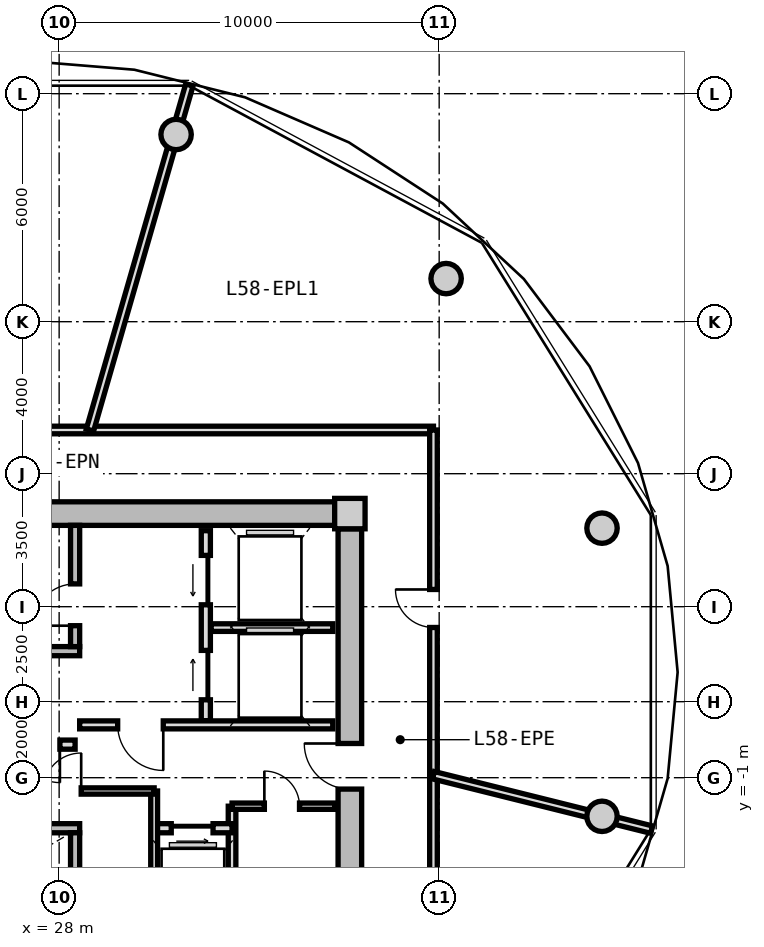
"""IFC4 building model, lengths in metres.
Left out: names, types, materials, properties, quantities, classifications, styles, units other than length and angle.
Written with IfcOpenShell. Run it as: python <this file> out.ifc"""

import sys

from ifc_helpers import new_model, si_unit, direction, frame, frame_2d, origin, origin_2d, place, context, subcontext, project, spatial, rectangle, circle, extrude, source, transform, mapped, element, fill, save


model = new_model("IFC4")
c1 = context("Model", 3, precision=1e-05, world=origin(), true_north=direction((0.0, 1.0)))
c2 = subcontext(c1, "Body", "Model", "MODEL_VIEW")
j1 = project(units=[si_unit("LENGTHUNIT", "METRE"), si_unit("PLANEANGLEUNIT", "RADIAN")], contexts=[c1])
p1 = place(None, origin())
s1 = spatial("IfcSite", under=j1, at=p1, CompositionType="ELEMENT")
p2 = place(p1, origin())
s2 = spatial("IfcBuilding", under=s1, at=p2, CompositionType="ELEMENT")
p3 = place(p2, frame((0.0, 0.0, 186.15)))
s3 = spatial("IfcBuildingStorey", under=s2, at=p3, CompositionType="ELEMENT", Elevation=186.15)
m1 = source(origin(), c2, "Body", "SweptSolid", [
    extrude(rectangle(XDim=0.8, YDim=0.8, at=origin_2d()), origin(), (0.0, 0.0, 1.0), 4.5),
])
p4 = place(p3, frame((35.65, 5.95, 0.0), z_axis=(0.0, 0.0, 1.0), x_axis=(1.0, 0.0, 0.0)))
e1 = element("IfcColumn", 1, at=p4, inside=s3, PredefinedType="COLUMN", context=c2, shape_type="MappedRepresentation", body=[
    mapped(m1, transform((0.0, 0.0, 0.0), x_axis=(1.0, 0.0, 0.0), y_axis=(0.0, 1.0, 0.0), z_axis=(0.0, 0.0, 1.0), scale=1.0)),
])
m2 = source(origin(), c2, "Body", "SweptSolid", [
    extrude(rectangle(XDim=14.5, YDim=0.62, at=frame_2d((7.25, 0.0))), origin(), (0.0, 0.0, 1.0), 4.08),
])
p5 = place(p3, frame((20.75, 5.95, 0.0), z_axis=(0.0, 0.0, 1.0), x_axis=(1.0, 0.0, 0.0)))
e2 = element("IfcWall", 2, at=p5, inside=s3, PredefinedType="SHEAR", context=c2, shape_type="MappedRepresentation", body=[
    mapped(m2, transform((0.0, 0.0, 0.0), x_axis=(1.0, 0.0, 0.0), y_axis=(0.0, 1.0, 0.0), z_axis=(0.0, 0.0, 1.0), scale=1.0)),
])
m3 = source(origin(), c2, "Body", "SweptSolid", [
    extrude(rectangle(XDim=11.1, YDim=0.62, at=frame_2d((5.55, 0.0))), origin(), (0.0, 0.0, 1.0), 4.08),
])
p6 = place(p3, frame((35.65, 5.55, 0.0), z_axis=(0.0, 0.0, 1.0), x_axis=(0.0, -1.0, 0.0)))
e3 = element("IfcWall", 3, at=p6, inside=s3, PredefinedType="SHEAR", context=c2, shape_type="MappedRepresentation", body=[
    mapped(m3, transform((0.0, 0.0, 0.0), x_axis=(1.0, 0.0, 0.0), y_axis=(0.0, 1.0, 0.0), z_axis=(0.0, 0.0, 1.0), scale=1.0)),
])
p7 = place(p6, frame((5.65, 0.0, 0.0)))
e4 = element("IfcOpeningElement", 4, at=p7, cuts=e3, PredefinedType="OPENING", context=c2, shape_type="SweptSolid", body=[
    extrude(rectangle(XDim=1.2, YDim=2.15, at=frame_2d((0.6, 1.075))), frame((0.0, 0.32, 0.0), z_axis=(0.0, -1.0, 0.0), x_axis=(1.0, 0.0, 0.0)), (0.0, 0.0, 1.0), 0.64),
])
p8 = place(p6, frame((9.3, 0.0, 0.0)))
e5 = element("IfcOpeningElement", 5, at=p8, cuts=e3, PredefinedType="OPENING", context=c2, shape_type="SweptSolid", body=[
    extrude(rectangle(XDim=1.0, YDim=2.1, at=frame_2d((0.5, 1.05))), frame((0.0, 0.32, 0.0), z_axis=(0.0, -1.0, 0.0), x_axis=(1.0, 0.0, 0.0)), (0.0, 0.0, 1.0), 0.64),
])
m4 = source(origin(), c2, "Body", "SweptSolid", [
    extrude(circle(Radius=0.4, at=origin_2d()), origin(), (0.0, 0.0, 1.0), 4.08),
])
for number, where, z_axis, x_axis in (
    (6, (42.285, 5.567, 0.0), (0.0, 0.0, 1.0), (1.0, 0.0, 0.0)),
    (7, (38.183, 12.135, 0.0), (0.0, 0.0, 1.0), (1.0, 0.0, 0.0)),
    (8, (31.077, 15.926, 0.0), (0.0, 0.0, 1.0), (1.0, 0.0, 0.0)),
    (9, (42.285, -2.016, 0.0), (0.0, 0.0, 1.0), (1.0, 0.0, 0.0)),
):
    element("IfcColumn", number, at=place(p3, frame(where, z_axis=z_axis, x_axis=x_axis)), inside=s3, PredefinedType="COLUMN", context=c2, shape_type="MappedRepresentation", body=[
        mapped(m4, transform((0.0, 0.0, 0.0), x_axis=(1.0, 0.0, 0.0), y_axis=(0.0, 1.0, 0.0), z_axis=(0.0, 0.0, 1.0), scale=1.0)),
    ])
m5 = source(origin(), c2, "Body", "SweptSolid", [
    extrude(rectangle(XDim=7.88, YDim=0.24, at=frame_2d((3.94, 0.0))), origin(), (0.0, 0.0, 1.0), 4.08),
])
p9 = place(p3, frame((20.66, 2.33, 0.0), z_axis=(0.0, 0.0, 1.0), x_axis=(1.0, 0.0, 0.0)))
e10 = element("IfcWall", 10, at=p9, inside=s3, PredefinedType="PARTITIONING", context=c2, shape_type="MappedRepresentation", body=[
    mapped(m5, transform((0.0, 0.0, 0.0), x_axis=(1.0, 0.0, 0.0), y_axis=(0.0, 1.0, 0.0), z_axis=(0.0, 0.0, 1.0), scale=1.0)),
])
m6 = source(origin(), c2, "Body", "SweptSolid", [
    extrude(rectangle(XDim=3.19, YDim=0.24, at=frame_2d((1.595, 0.0))), origin(), (0.0, 0.0, 1.0), 4.08),
])
p10 = place(p3, frame((28.42, 2.45, 0.0), z_axis=(0.0, 0.0, 1.0), x_axis=(0.0, 1.0, 0.0)))
e11 = element("IfcWall", 11, at=p10, inside=s3, PredefinedType="PARTITIONING", context=c2, shape_type="MappedRepresentation", body=[
    mapped(m6, transform((0.0, 0.0, 0.0), x_axis=(1.0, 0.0, 0.0), y_axis=(0.0, 1.0, 0.0), z_axis=(0.0, 0.0, 1.0), scale=1.0)),
])
p11 = place(p10, frame((0.55, 0.0, 0.0)))
e12 = element("IfcOpeningElement", 12, at=p11, cuts=e11, PredefinedType="OPENING", context=c2, shape_type="SweptSolid", body=[
    extrude(rectangle(XDim=1.1, YDim=2.15, at=frame_2d((0.55, 1.075))), frame((0.0, 0.13, 0.0), z_axis=(0.0, -1.0, 0.0), x_axis=(1.0, 0.0, 0.0)), (0.0, 0.0, 1.0), 0.26),
])
p12 = place(p3, frame((20.66, -2.33, 0.0), z_axis=(0.0, 0.0, 1.0), x_axis=(1.0, 0.0, 0.0)))
e13 = element("IfcWall", 13, at=p12, inside=s3, PredefinedType="PARTITIONING", context=c2, shape_type="MappedRepresentation", body=[
    mapped(m5, transform((0.0, 0.0, 0.0), x_axis=(1.0, 0.0, 0.0), y_axis=(0.0, 1.0, 0.0), z_axis=(0.0, 0.0, 1.0), scale=1.0)),
])
p13 = place(p12, frame((1.0, 0.0, 0.0)))
e14 = element("IfcOpeningElement", 14, at=p13, cuts=e13, PredefinedType="OPENING", context=c2, shape_type="SweptSolid", body=[
    extrude(rectangle(XDim=1.1, YDim=2.15, at=frame_2d((0.55, 1.075))), frame((0.0, 0.13, 0.0), z_axis=(0.0, -1.0, 0.0), x_axis=(1.0, 0.0, 0.0)), (0.0, 0.0, 1.0), 0.26),
])
p14 = place(p3, frame((28.42, -5.64, 0.0), z_axis=(0.0, 0.0, 1.0), x_axis=(0.0, 1.0, 0.0)))
e15 = element("IfcWall", 15, at=p14, inside=s3, PredefinedType="PARTITIONING", context=c2, shape_type="MappedRepresentation", body=[
    mapped(m6, transform((0.0, 0.0, 0.0), x_axis=(1.0, 0.0, 0.0), y_axis=(0.0, 1.0, 0.0), z_axis=(0.0, 0.0, 1.0), scale=1.0)),
])
m7 = source(origin(), c2, "Body", "SweptSolid", [
    extrude(rectangle(XDim=5.0, YDim=0.24, at=frame_2d((2.5, 0.0))), origin(), (0.0, 0.0, 1.0), 4.065),
])
p15 = place(p3, frame((31.86, 0.5, 0.0), z_axis=(0.0, 0.0, 1.0), x_axis=(0.0, 1.0, 0.0)))
e16 = element("IfcWall", 16, at=p15, inside=s3, PredefinedType="PARTITIONING", context=c2, shape_type="MappedRepresentation", body=[
    mapped(m7, transform((0.0, 0.0, 0.0), x_axis=(1.0, 0.0, 0.0), y_axis=(0.0, 1.0, 0.0), z_axis=(0.0, 0.0, 1.0), scale=1.0)),
])
p16 = place(p15, frame((3.05, 0.0, 0.0)))
e17 = element("IfcOpeningElement", 17, at=p16, cuts=e16, PredefinedType="OPENING", context=c2, shape_type="SweptSolid", body=[
    extrude(rectangle(XDim=1.3, YDim=2.2, at=frame_2d((0.65, 1.1))), frame((0.0, 0.13, 0.0), z_axis=(0.0, -1.0, 0.0), x_axis=(1.0, 0.0, 0.0)), (0.0, 0.0, 1.0), 0.26),
])
p17 = place(p15, frame((0.55, 0.0, 0.0)))
e18 = element("IfcOpeningElement", 18, at=p17, cuts=e16, PredefinedType="OPENING", context=c2, shape_type="SweptSolid", body=[
    extrude(rectangle(XDim=1.3, YDim=2.2, at=frame_2d((0.65, 1.1))), frame((0.0, 0.13, 0.0), z_axis=(0.0, -1.0, 0.0), x_axis=(1.0, 0.0, 0.0)), (0.0, 0.0, 1.0), 0.26),
])
m8 = source(origin(), c2, "Body", "SweptSolid", [
    extrude(rectangle(XDim=3.2, YDim=0.2, at=frame_2d((1.6, 0.0))), origin(), (0.0, 0.0, 1.0), 4.065),
])
p18 = place(p3, frame((32.0, 2.95, 0.0), z_axis=(0.0, 0.0, 1.0), x_axis=(1.0, 0.0, 0.0)))
e19 = element("IfcWall", 19, at=p18, inside=s3, PredefinedType="PARTITIONING", context=c2, shape_type="MappedRepresentation", body=[
    mapped(m8, transform((0.0, 0.0, 0.0), x_axis=(1.0, 0.0, 0.0), y_axis=(0.0, 1.0, 0.0), z_axis=(0.0, 0.0, 1.0), scale=1.0)),
])
m9 = source(origin(), c2, "Body", "SweptSolid", [
    extrude(rectangle(XDim=6.66, YDim=0.21, at=frame_2d((3.33, 0.0))), origin(), (0.0, 0.0, 1.0), 4.065),
])
p19 = place(p3, frame((28.54, 0.39, 0.0), z_axis=(0.0, 0.0, 1.0), x_axis=(1.0, 0.0, 0.0)))
e20 = element("IfcWall", 20, at=p19, inside=s3, PredefinedType="PARTITIONING", context=c2, shape_type="MappedRepresentation", body=[
    mapped(m9, transform((0.0, 0.0, 0.0), x_axis=(1.0, 0.0, 0.0), y_axis=(0.0, 1.0, 0.0), z_axis=(0.0, 0.0, 1.0), scale=1.0)),
])
p20 = place(p19, frame((1.0, 0.0, 0.0)))
e21 = element("IfcOpeningElement", 21, at=p20, cuts=e20, PredefinedType="OPENING", context=c2, shape_type="SweptSolid", body=[
    extrude(rectangle(XDim=1.2, YDim=2.15, at=frame_2d((0.6, 1.075))), frame((0.0, 0.115, 0.0), z_axis=(0.0, -1.0, 0.0), x_axis=(1.0, 0.0, 0.0)), (0.0, 0.0, 1.0), 0.23),
])
m10 = source(origin(), c2, "Body", "SweptSolid", [
    extrude(rectangle(XDim=7.62, YDim=0.24, at=frame_2d((3.81, 0.0))), origin(), (0.0, 0.0, 1.0), 4.065),
])
p21 = place(p3, frame((20.8, -0.13, 0.0), z_axis=(0.0, 0.0, 1.0), x_axis=(1.0, 0.0, 0.0)))
e22 = element("IfcWall", 22, at=p21, inside=s3, PredefinedType="PARTITIONING", context=c2, shape_type="MappedRepresentation", body=[
    mapped(m10, transform((0.0, 0.0, 0.0), x_axis=(1.0, 0.0, 0.0), y_axis=(0.0, 1.0, 0.0), z_axis=(0.0, 0.0, 1.0), scale=1.0)),
])
p22 = place(p21, frame((6.22, 0.0, 0.0)))
e23 = element("IfcOpeningElement", 23, at=p22, cuts=e22, PredefinedType="OPENING", context=c2, shape_type="SweptSolid", body=[
    extrude(rectangle(XDim=1.0, YDim=2.1, at=frame_2d((0.5, 1.05))), frame((0.0, 0.13, 0.0), z_axis=(0.0, -1.0, 0.0), x_axis=(1.0, 0.0, 0.0)), (0.0, 0.0, 1.0), 0.26),
])
p23 = place(p21, frame((2.4, 0.0, 0.0)))
e24 = element("IfcOpeningElement", 24, at=p23, cuts=e22, PredefinedType="OPENING", context=c2, shape_type="SweptSolid", body=[
    extrude(rectangle(XDim=1.0, YDim=2.1, at=frame_2d((0.5, 1.05))), frame((0.0, 0.13, 0.0), z_axis=(0.0, -1.0, 0.0), x_axis=(1.0, 0.0, 0.0)), (0.0, 0.0, 1.0), 0.26),
])
m11 = source(origin(), c2, "Body", "SweptSolid", [
    extrude(rectangle(XDim=3.8, YDim=0.2, at=frame_2d((1.9, 0.0))), origin(), (0.0, 0.0, 1.0), 4.065),
])
p24 = place(p3, frame((32.55, -5.55, 0.0), z_axis=(0.0, 0.0, 1.0), x_axis=(0.0, 1.0, 0.0)))
e25 = element("IfcWall", 25, at=p24, inside=s3, PredefinedType="PARTITIONING", context=c2, shape_type="MappedRepresentation", body=[
    mapped(m11, transform((0.0, 0.0, 0.0), x_axis=(1.0, 0.0, 0.0), y_axis=(0.0, 1.0, 0.0), z_axis=(0.0, 0.0, 1.0), scale=1.0)),
])
m12 = source(origin(), c2, "Body", "SweptSolid", [
    extrude(rectangle(XDim=2.05, YDim=0.24, at=frame_2d((1.025, 0.0))), origin(), (0.0, 0.0, 1.0), 4.065),
])
p25 = place(p3, frame((30.5, -2.33, 0.0), z_axis=(0.0, 0.0, 1.0), x_axis=(1.0, 0.0, 0.0)))
e26 = element("IfcWall", 26, at=p25, inside=s3, PredefinedType="PARTITIONING", context=c2, shape_type="MappedRepresentation", body=[
    mapped(m12, transform((0.0, 0.0, 0.0), x_axis=(1.0, 0.0, 0.0), y_axis=(0.0, 1.0, 0.0), z_axis=(0.0, 0.0, 1.0), scale=1.0)),
])
p26 = place(p25, frame((0.45, 0.0, 0.0)))
e27 = element("IfcOpeningElement", 27, at=p26, cuts=e26, PredefinedType="OPENING", context=c2, shape_type="SweptSolid", body=[
    extrude(rectangle(XDim=1.1, YDim=2.2, at=frame_2d((0.55, 1.1))), frame((0.0, 0.13, 0.0), z_axis=(0.0, -1.0, 0.0), x_axis=(1.0, 0.0, 0.0)), (0.0, 0.0, 1.0), 0.26),
])
m13 = source(origin(), c2, "Body", "SweptSolid", [
    extrude(rectangle(XDim=4.2, YDim=0.18, at=frame_2d((2.1, 0.0))), origin(), (0.0, 0.0, 1.0), 4.065),
])
p27 = place(p3, frame((30.5, -5.55, 0.0), z_axis=(0.0, 0.0, 1.0), x_axis=(0.0, 1.0, 0.0)))
e28 = element("IfcWall", 28, at=p27, inside=s3, PredefinedType="PARTITIONING", context=c2, shape_type="MappedRepresentation", body=[
    mapped(m13, transform((0.0, 0.0, 0.0), x_axis=(1.0, 0.0, 0.0), y_axis=(0.0, 1.0, 0.0), z_axis=(0.0, 0.0, 1.0), scale=1.0)),
])
m14 = source(origin(), c2, "Body", "SweptSolid", [
    extrude(rectangle(XDim=4.77, YDim=0.165, at=frame_2d((2.385, 0.0))), origin(), (0.0, 0.0, 1.0), 4.065),
])
p28 = place(p3, frame((25.73, -1.35, 0.0), z_axis=(0.0, 0.0, 1.0), x_axis=(1.0, 0.0, 0.0)))
e29 = element("IfcWall", 29, at=p28, inside=s3, PredefinedType="PARTITIONING", context=c2, shape_type="MappedRepresentation", body=[
    mapped(m14, transform((0.0, 0.0, 0.0), x_axis=(1.0, 0.0, 0.0), y_axis=(0.0, 1.0, 0.0), z_axis=(0.0, 0.0, 1.0), scale=1.0)),
])
p29 = place(p28, frame((1.85, 0.0, 0.0)))
e30 = element("IfcOpeningElement", 30, at=p29, cuts=e29, PredefinedType="OPENING", context=c2, shape_type="SweptSolid", body=[
    extrude(rectangle(XDim=1.0, YDim=2.1, at=frame_2d((0.5, 1.05))), frame((0.0, 0.093, 0.0), z_axis=(0.0, -1.0, 0.0), x_axis=(1.0, 0.0, 0.0)), (0.0, 0.0, 1.0), 0.185),
])
m15 = source(origin(), c2, "Body", "SweptSolid", [
    extrude(rectangle(XDim=2.7, YDim=0.165, at=frame_2d((1.35, 0.0))), origin(), (0.0, 0.0, 1.0), 4.065),
])
p30 = place(p3, frame((32.55, -1.75, 0.0), z_axis=(0.0, 0.0, 1.0), x_axis=(1.0, 0.0, 0.0)))
e31 = element("IfcWall", 31, at=p30, inside=s3, PredefinedType="PARTITIONING", context=c2, shape_type="MappedRepresentation", body=[
    mapped(m15, transform((0.0, 0.0, 0.0), x_axis=(1.0, 0.0, 0.0), y_axis=(0.0, 1.0, 0.0), z_axis=(0.0, 0.0, 1.0), scale=1.0)),
])
p31 = place(p30, frame((0.85, 0.0, 0.0)))
e32 = element("IfcOpeningElement", 32, at=p31, cuts=e31, PredefinedType="OPENING", context=c2, shape_type="SweptSolid", body=[
    extrude(rectangle(XDim=0.925, YDim=2.1, at=frame_2d((0.462, 1.05))), frame((0.0, 0.093, 0.0), z_axis=(0.0, -1.0, 0.0), x_axis=(1.0, 0.0, 0.0)), (0.0, 0.0, 1.0), 0.185),
])
m16 = source(origin(), c2, "Body", "SweptSolid", [
    extrude(rectangle(XDim=19.7, YDim=0.2, at=frame_2d((9.85, 0.0))), origin(), (0.0, 0.0, 1.0), 4.065),
])
p32 = place(p3, frame((18.15, 8.15, 0.0), z_axis=(0.0, 0.0, 1.0), x_axis=(1.0, 0.0, 0.0)))
e33 = element("IfcWall", 33, at=p32, inside=s3, PredefinedType="PARTITIONING", context=c2, shape_type="MappedRepresentation", body=[
    mapped(m16, transform((0.0, 0.0, 0.0), x_axis=(1.0, 0.0, 0.0), y_axis=(0.0, 1.0, 0.0), z_axis=(0.0, 0.0, 1.0), scale=1.0)),
])
p33 = place(p32, frame((4.968, 0.0, 0.0)))
e34 = element("IfcOpeningElement", 34, at=p33, cuts=e33, PredefinedType="OPENING", context=c2, shape_type="SweptSolid", body=[
    extrude(rectangle(XDim=1.0, YDim=2.1, at=frame_2d((0.5, 1.05))), frame((0.0, 0.11, 0.0), z_axis=(0.0, -1.0, 0.0), x_axis=(1.0, 0.0, 0.0)), (0.0, 0.0, 1.0), 0.22),
])
m17 = source(origin(), c2, "Body", "SweptSolid", [
    extrude(rectangle(XDim=16.3, YDim=0.2, at=frame_2d((8.15, 0.0))), origin(), (0.0, 0.0, 1.0), 4.065),
])
p34 = place(p3, frame((37.85, 8.15, 0.0), z_axis=(0.0, 0.0, 1.0), x_axis=(0.0, -1.0, 0.0)))
e35 = element("IfcWall", 35, at=p34, inside=s3, PredefinedType="PARTITIONING", context=c2, shape_type="MappedRepresentation", body=[
    mapped(m17, transform((0.0, 0.0, 0.0), x_axis=(1.0, 0.0, 0.0), y_axis=(0.0, 1.0, 0.0), z_axis=(0.0, 0.0, 1.0), scale=1.0)),
])
p35 = place(p34, frame((4.197, 0.0, 0.0)))
e36 = element("IfcOpeningElement", 36, at=p35, cuts=e35, PredefinedType="OPENING", context=c2, shape_type="SweptSolid", body=[
    extrude(rectangle(XDim=1.0, YDim=2.1, at=frame_2d((0.5, 1.05))), frame((0.0, 0.11, 0.0), z_axis=(0.0, -1.0, 0.0), x_axis=(1.0, 0.0, 0.0)), (0.0, 0.0, 1.0), 0.22),
])
m18 = source(origin(), c2, "Body", "SweptSolid", [
    extrude(rectangle(XDim=5.914, YDim=0.2, at=frame_2d((2.957, 0.0))), origin(), (0.0, 0.0, 1.0), 4.065),
])
p36 = place(p3, frame((37.85, -0.935, 0.0), z_axis=(0.0, 0.0, 1.0), x_axis=(0.970312235668, -0.241855670415, 0.0)))
e37 = element("IfcWall", 37, at=p36, inside=s3, PredefinedType="PARTITIONING", context=c2, shape_type="MappedRepresentation", body=[
    mapped(m18, transform((0.0, 0.0, 0.0), x_axis=(1.0, 0.0, 0.0), y_axis=(0.0, 1.0, 0.0), z_axis=(0.0, 0.0, 1.0), scale=1.0)),
])
m19 = source(origin(), c2, "Body", "SweptSolid", [
    extrude(rectangle(XDim=9.449, YDim=0.2, at=frame_2d((4.725, 0.0))), origin(), (0.0, 0.0, 1.0), 4.065),
])
p37 = place(p3, frame((28.811, 8.15, 0.0), z_axis=(0.0, 0.0, 1.0), x_axis=(0.276784966388, 0.96093188228, 0.0)))
e38 = element("IfcWall", 38, at=p37, inside=s3, PredefinedType="PARTITIONING", context=c2, shape_type="MappedRepresentation", body=[
    mapped(m19, transform((0.0, 0.0, 0.0), x_axis=(1.0, 0.0, 0.0), y_axis=(0.0, 1.0, 0.0), z_axis=(0.0, 0.0, 1.0), scale=1.0)),
])
m20 = source(origin(), c2, "Body", "SweptSolid", [
    extrude(rectangle(XDim=1.1, YDim=2.15, at=frame_2d((0.55, 1.075))), frame((0.0, 0.025, 0.0), z_axis=(0.0, -1.0, 0.0), x_axis=(1.0, 0.0, 0.0)), (0.0, 0.0, 1.0), 0.05),
])
p38 = place(p11, origin())
e39 = element("IfcDoor", 39, at=p38, inside=s3, OperationType="SINGLE_SWING_LEFT", PredefinedType="DOOR", context=c2, shape_type="MappedRepresentation", body=[
    mapped(m20, transform((0.0, 0.0, 0.0), x_axis=(1.0, 0.0, 0.0), y_axis=(0.0, 1.0, 0.0), z_axis=(0.0, 0.0, 1.0), scale=1.0)),
])
fill(e12, e39)
m21 = source(origin(), c2, "Body", "SweptSolid", [
    extrude(rectangle(XDim=1.3, YDim=2.2, at=frame_2d((0.65, 1.1))), frame((0.0, 0.025, 0.0), z_axis=(0.0, -1.0, 0.0), x_axis=(1.0, 0.0, 0.0)), (0.0, 0.0, 1.0), 0.05),
])
p39 = place(p16, origin())
e40 = element("IfcDoor", 40, at=p39, inside=s3, OperationType="SLIDING_TO_LEFT", PredefinedType="DOOR", context=c2, shape_type="MappedRepresentation", body=[
    mapped(m21, transform((0.0, 0.0, 0.0), x_axis=(1.0, 0.0, 0.0), y_axis=(0.0, 1.0, 0.0), z_axis=(0.0, 0.0, 1.0), scale=1.0)),
])
fill(e17, e40)
p40 = place(p17, origin())
e41 = element("IfcDoor", 41, at=p40, inside=s3, OperationType="SLIDING_TO_RIGHT", PredefinedType="DOOR", context=c2, shape_type="MappedRepresentation", body=[
    mapped(m21, transform((0.0, 0.0, 0.0), x_axis=(1.0, 0.0, 0.0), y_axis=(0.0, 1.0, 0.0), z_axis=(0.0, 0.0, 1.0), scale=1.0)),
])
fill(e18, e41)
m22 = source(origin(), c2, "Body", "SweptSolid", [
    extrude(rectangle(XDim=1.2, YDim=2.15, at=frame_2d((0.6, 1.075))), frame((0.0, 0.025, 0.0), z_axis=(0.0, -1.0, 0.0), x_axis=(1.0, 0.0, 0.0)), (0.0, 0.0, 1.0), 0.05),
])
p41 = place(p20, frame((1.2, 0.0, 0.0), z_axis=(0.0, 0.0, 1.0), x_axis=(-1.0, 0.0, 0.0)))
e42 = element("IfcDoor", 42, at=p41, inside=s3, OperationType="SINGLE_SWING_LEFT", PredefinedType="DOOR", context=c2, shape_type="MappedRepresentation", body=[
    mapped(m22, transform((0.0, 0.0, 0.0), x_axis=(1.0, 0.0, 0.0), y_axis=(0.0, 1.0, 0.0), z_axis=(0.0, 0.0, 1.0), scale=1.0)),
])
fill(e21, e42)
p42 = place(p7, frame((1.2, 0.0, 0.0), z_axis=(0.0, 0.0, 1.0), x_axis=(-1.0, 0.0, 0.0)))
e43 = element("IfcDoor", 43, at=p42, inside=s3, OperationType="SINGLE_SWING_RIGHT", PredefinedType="DOOR", context=c2, shape_type="MappedRepresentation", body=[
    mapped(m22, transform((0.0, 0.0, 0.0), x_axis=(1.0, 0.0, 0.0), y_axis=(0.0, 1.0, 0.0), z_axis=(0.0, 0.0, 1.0), scale=1.0)),
])
fill(e4, e43)
m23 = source(origin(), c2, "Body", "SweptSolid", [
    extrude(rectangle(XDim=1.0, YDim=2.1, at=frame_2d((0.5, 1.05))), frame((0.0, 0.025, 0.0), z_axis=(0.0, -1.0, 0.0), x_axis=(1.0, 0.0, 0.0)), (0.0, 0.0, 1.0), 0.05),
])
p43 = place(p22, frame((1.0, 0.0, 0.0), z_axis=(0.0, 0.0, 1.0), x_axis=(-1.0, 0.0, 0.0)))
e44 = element("IfcDoor", 44, at=p43, inside=s3, OperationType="SINGLE_SWING_LEFT", PredefinedType="DOOR", context=c2, shape_type="MappedRepresentation", body=[
    mapped(m23, transform((0.0, 0.0, 0.0), x_axis=(1.0, 0.0, 0.0), y_axis=(0.0, 1.0, 0.0), z_axis=(0.0, 0.0, 1.0), scale=1.0)),
])
fill(e23, e44)
m24 = source(origin(), c2, "Body", "SweptSolid", [
    extrude(rectangle(XDim=1.1, YDim=2.2, at=frame_2d((0.55, 1.1))), frame((0.0, 0.025, 0.0), z_axis=(0.0, -1.0, 0.0), x_axis=(1.0, 0.0, 0.0)), (0.0, 0.0, 1.0), 0.05),
])
p44 = place(p26, frame((1.1, 0.0, 0.0), z_axis=(0.0, 0.0, 1.0), x_axis=(-1.0, 0.0, 0.0)))
e45 = element("IfcDoor", 45, at=p44, inside=s3, OperationType="SLIDING_TO_RIGHT", PredefinedType="DOOR", context=c2, shape_type="MappedRepresentation", body=[
    mapped(m24, transform((0.0, 0.0, 0.0), x_axis=(1.0, 0.0, 0.0), y_axis=(0.0, 1.0, 0.0), z_axis=(0.0, 0.0, 1.0), scale=1.0)),
])
fill(e27, e45)
p45 = place(p29, origin())
e46 = element("IfcDoor", 46, at=p45, inside=s3, OperationType="SINGLE_SWING_RIGHT", PredefinedType="DOOR", context=c2, shape_type="MappedRepresentation", body=[
    mapped(m23, transform((0.0, 0.0, 0.0), x_axis=(1.0, 0.0, 0.0), y_axis=(0.0, 1.0, 0.0), z_axis=(0.0, 0.0, 1.0), scale=1.0)),
])
fill(e30, e46)
m25 = source(origin(), c2, "Body", "SweptSolid", [
    extrude(rectangle(XDim=0.925, YDim=2.1, at=frame_2d((0.462, 1.05))), frame((0.0, 0.025, 0.0), z_axis=(0.0, -1.0, 0.0), x_axis=(1.0, 0.0, 0.0)), (0.0, 0.0, 1.0), 0.05),
])
p46 = place(p31, origin())
e47 = element("IfcDoor", 47, at=p46, inside=s3, OperationType="SINGLE_SWING_LEFT", PredefinedType="DOOR", context=c2, shape_type="MappedRepresentation", body=[
    mapped(m25, transform((0.0, 0.0, 0.0), x_axis=(1.0, 0.0, 0.0), y_axis=(0.0, 1.0, 0.0), z_axis=(0.0, 0.0, 1.0), scale=1.0)),
])
fill(e32, e47)
p47 = place(p35, frame((1.0, 0.0, 0.0), z_axis=(0.0, 0.0, 1.0), x_axis=(-1.0, 0.0, 0.0)))
e48 = element("IfcDoor", 48, at=p47, inside=s3, OperationType="SINGLE_SWING_RIGHT", PredefinedType="DOOR", context=c2, shape_type="MappedRepresentation", body=[
    mapped(m23, transform((0.0, 0.0, 0.0), x_axis=(1.0, 0.0, 0.0), y_axis=(0.0, 1.0, 0.0), z_axis=(0.0, 0.0, 1.0), scale=1.0)),
])
fill(e36, e48)
save(model, sys.argv[1])
